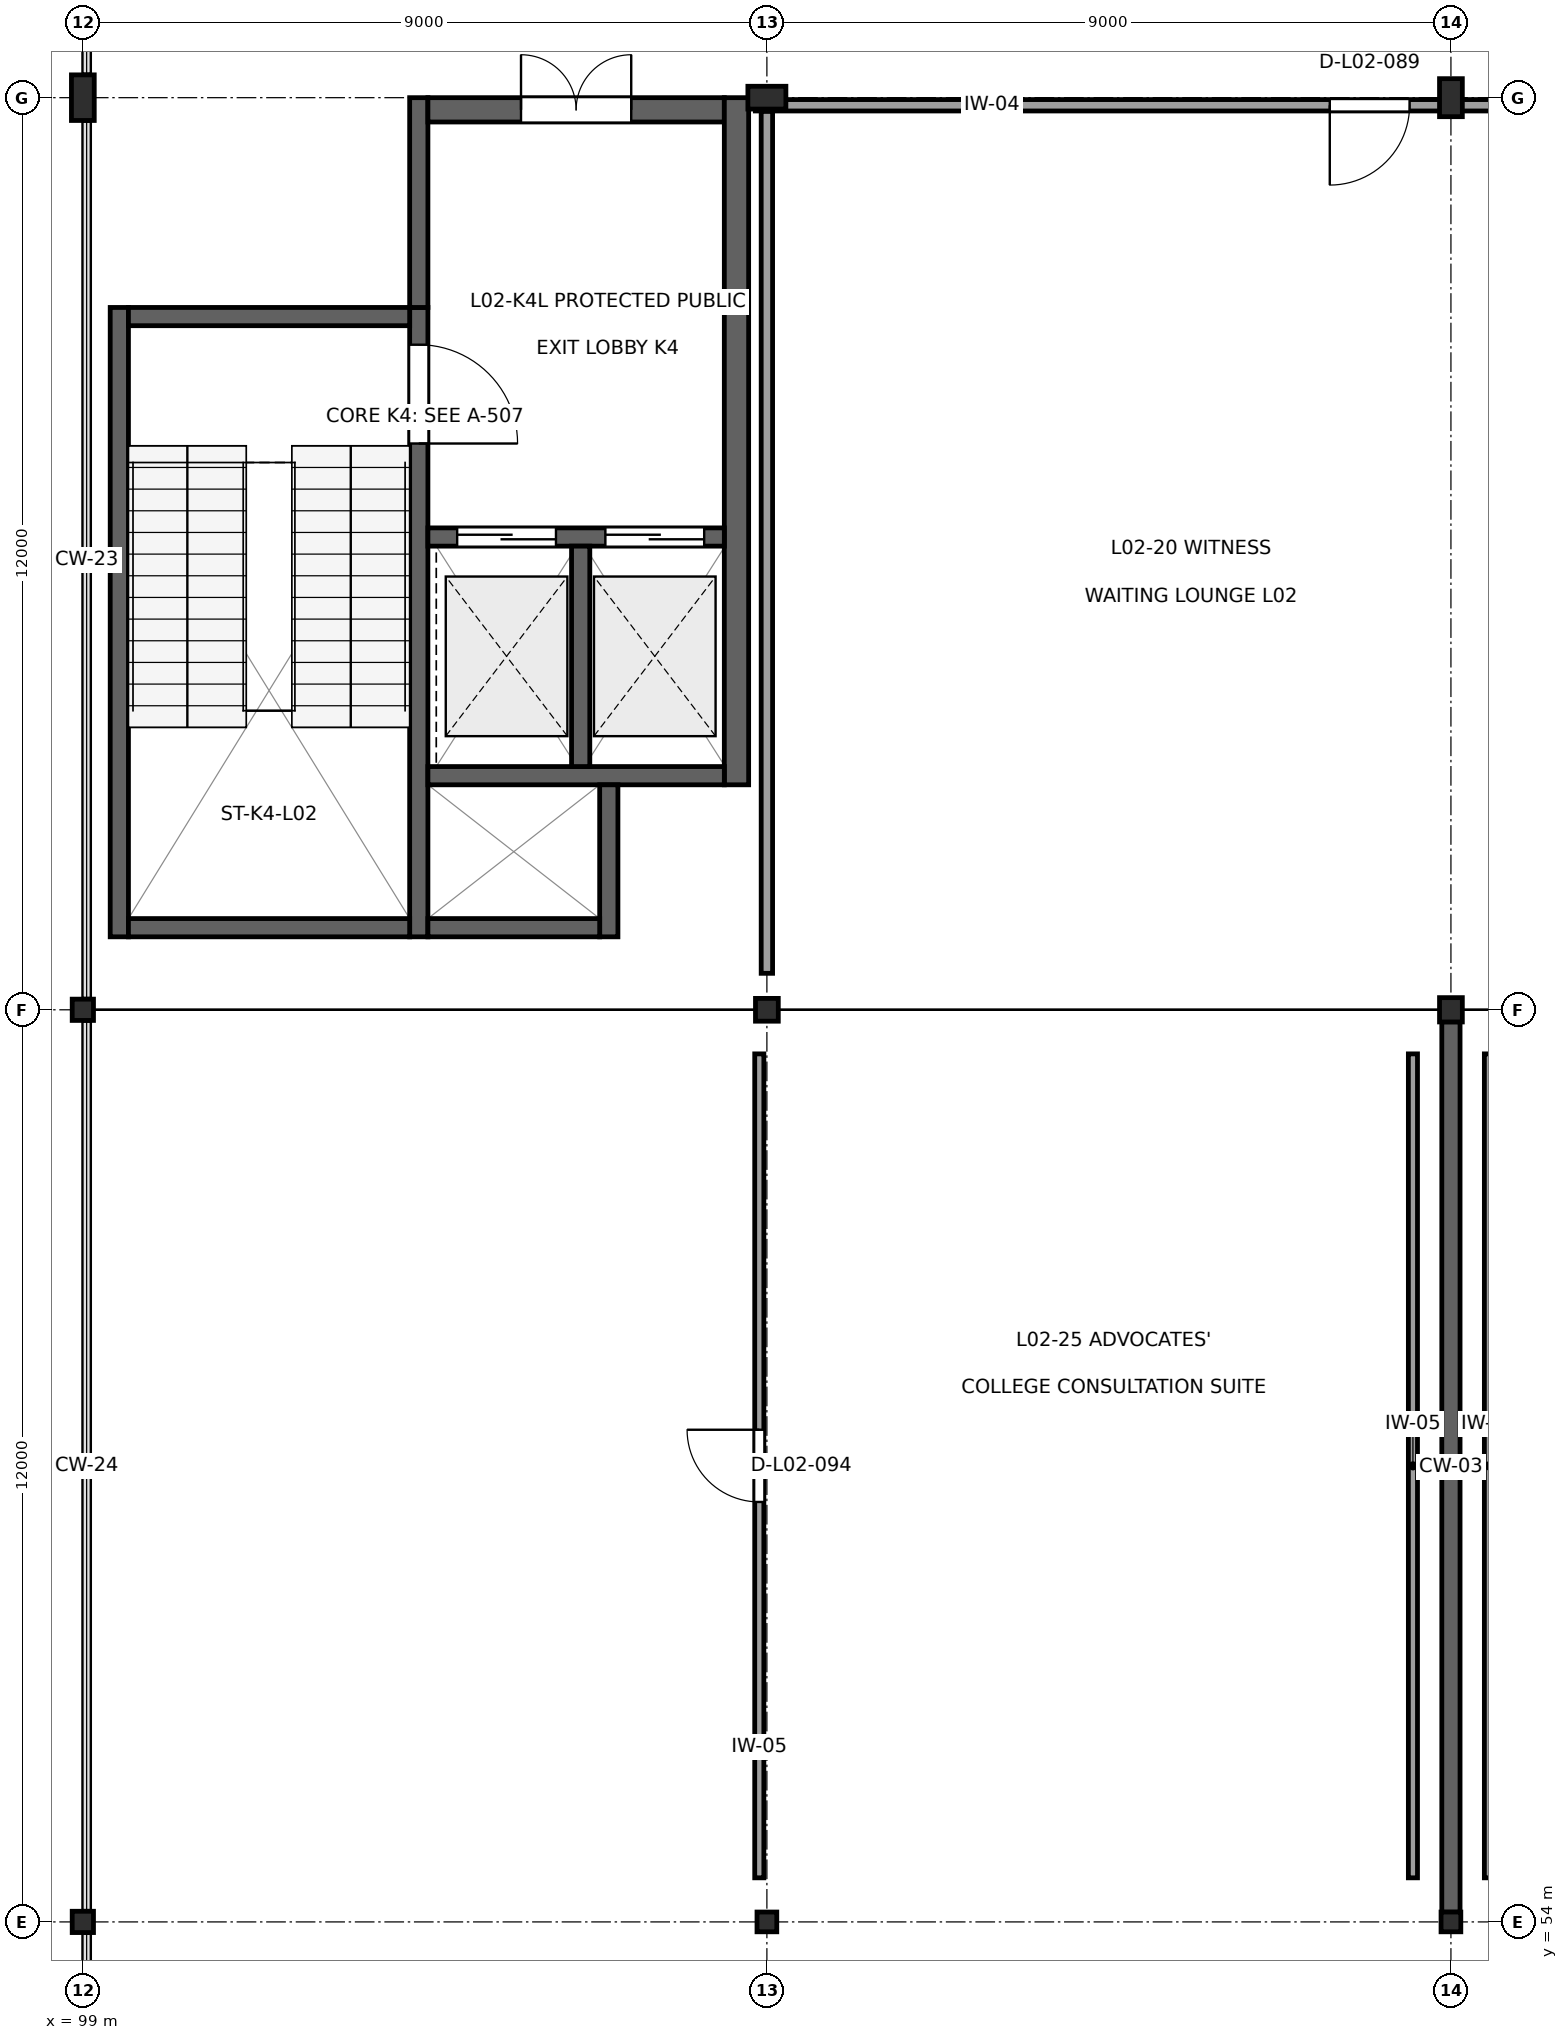
"""IFC4 building model, lengths in metres.
Left out: names, types, materials, properties, quantities, classifications, styles, units other than length and angle.
Written with IfcOpenShell. Run it as: python <this file> out.ifc"""

import sys

from ifc_helpers import new_model, si_unit, direction, frame, frame_2d, origin, origin_2d, place, context, subcontext, project, spatial, rectangle, i_section, extrude, element, fill, save


model = new_model("IFC4")
c1 = context("Model", 3, precision=1e-05, world=origin(), true_north=direction((0.0, 1.0)))
c2 = subcontext(c1, "Body", "Model", "MODEL_VIEW")
j1 = project(units=[si_unit("LENGTHUNIT", "METRE"), si_unit("PLANEANGLEUNIT", "RADIAN")], contexts=[c1])
p1 = place(None, origin())
s1 = spatial("IfcSite", under=j1, at=p1, CompositionType="ELEMENT")
p2 = place(p1, origin())
s2 = spatial("IfcBuilding", under=s1, at=p2, CompositionType="ELEMENT")
p3 = place(p2, frame((0.0, 0.0, 9.9)))
s3 = spatial("IfcBuildingStorey", under=s2, at=p3, CompositionType="ELEMENT", Elevation=9.9)
p4 = place(p3, frame((99.0, 54.0, 0.0), z_axis=(0.0, 0.0, 1.0), x_axis=(0.0, 1.0, 0.0)))
e1 = element("IfcColumn", 1, at=p4, inside=s3, PredefinedType="COLUMN", context=c2, shape_type="SweptSolid", body=[
    extrude(i_section(OverallWidth=0.28, OverallDepth=0.28, WebThickness=0.01, FlangeThickness=0.018, at=origin_2d()), origin(), (0.0, 0.0, 1.0), 4.3),
])
p5 = place(p3, frame((99.0, 66.0, 0.0), z_axis=(0.0, 0.0, 1.0), x_axis=(1.0, 0.0, 0.0)))
e2 = element("IfcColumn", 2, at=p5, inside=s3, PredefinedType="COLUMN", context=c2, shape_type="SweptSolid", body=[
    extrude(i_section(OverallWidth=0.28, OverallDepth=0.28, WebThickness=0.01, FlangeThickness=0.018, at=origin_2d()), origin(), (0.0, 0.0, 1.0), 4.5),
])
p6 = place(p3, frame((99.0, 78.0, 0.0), z_axis=(0.0, 0.0, 1.0), x_axis=(1.0, 0.0, 0.0)))
e3 = element("IfcColumn", 3, at=p6, inside=s3, PredefinedType="COLUMN", context=c2, shape_type="SweptSolid", body=[
    extrude(i_section(OverallWidth=0.3, OverallDepth=0.6, WebThickness=0.015, FlangeThickness=0.03, at=origin_2d()), origin(), (0.0, 0.0, 1.0), 4.5),
])
p7 = place(p3, frame((108.0, 54.0, 0.0), z_axis=(0.0, 0.0, 1.0), x_axis=(1.0, 0.0, 0.0)))
e4 = element("IfcColumn", 4, at=p7, inside=s3, PredefinedType="COLUMN", context=c2, shape_type="SweptSolid", body=[
    extrude(i_section(OverallWidth=0.26, OverallDepth=0.26, WebThickness=0.01, FlangeThickness=0.018, at=origin_2d()), origin(), (0.0, 0.0, 1.0), 4.3),
])
p8 = place(p3, frame((108.0, 66.0, 0.0), z_axis=(0.0, 0.0, 1.0), x_axis=(1.0, 0.0, 0.0)))
e5 = element("IfcColumn", 5, at=p8, inside=s3, PredefinedType="COLUMN", context=c2, shape_type="SweptSolid", body=[
    extrude(i_section(OverallWidth=0.3, OverallDepth=0.3, WebThickness=0.011, FlangeThickness=0.019, at=origin_2d()), origin(), (0.0, 0.0, 1.0), 4.5),
])
p9 = place(p3, frame((108.0, 78.0, 0.0), z_axis=(0.0, 0.0, 1.0), x_axis=(0.0, 1.0, 0.0)))
e6 = element("IfcColumn", 6, at=p9, inside=s3, PredefinedType="COLUMN", context=c2, shape_type="SweptSolid", body=[
    extrude(i_section(OverallWidth=0.3, OverallDepth=0.5, WebThickness=0.014, FlangeThickness=0.028, at=origin_2d()), origin(), (0.0, 0.0, 1.0), 4.5),
])
p10 = place(p3, frame((117.0, 54.0, 0.0), z_axis=(0.0, 0.0, 1.0), x_axis=(1.0, 0.0, 0.0)))
e7 = element("IfcColumn", 7, at=p10, inside=s3, PredefinedType="COLUMN", context=c2, shape_type="SweptSolid", body=[
    extrude(i_section(OverallWidth=0.26, OverallDepth=0.26, WebThickness=0.01, FlangeThickness=0.018, at=origin_2d()), origin(), (0.0, 0.0, 1.0), 4.3),
])
p11 = place(p3, frame((117.0, 66.0, 0.0), z_axis=(0.0, 0.0, 1.0), x_axis=(1.0, 0.0, 0.0)))
e8 = element("IfcColumn", 8, at=p11, inside=s3, PredefinedType="COLUMN", context=c2, shape_type="SweptSolid", body=[
    extrude(i_section(OverallWidth=0.3, OverallDepth=0.32, WebThickness=0.011, FlangeThickness=0.021, at=origin_2d()), origin(), (0.0, 0.0, 1.0), 4.5),
])
p12 = place(p3, frame((117.0, 78.0, 0.0), z_axis=(0.0, 0.0, 1.0), x_axis=(1.0, 0.0, 0.0)))
e9 = element("IfcColumn", 9, at=p12, inside=s3, PredefinedType="COLUMN", context=c2, shape_type="SweptSolid", body=[
    extrude(i_section(OverallWidth=0.3, OverallDepth=0.5, WebThickness=0.014, FlangeThickness=0.028, at=origin_2d()), origin(), (0.0, 0.0, 1.0), 4.5),
])
p13 = place(p3, frame((99.48, 66.96, 0.0), z_axis=(0.0, 0.0, 1.0), x_axis=(0.0, 1.0, 0.0)))
e10 = element("IfcWall", 10, at=p13, inside=s3, PredefinedType="SHEAR", context=c2, shape_type="SweptSolid", body=[
    extrude(rectangle(XDim=8.28, YDim=0.24, at=frame_2d((4.14, 0.0))), origin(), (0.0, 0.0, 1.0), 4.31),
])
p14 = place(p3, frame((103.42, 66.96, 0.0), z_axis=(0.0, 0.0, 1.0), x_axis=(0.0, 1.0, 0.0)))
e11 = element("IfcWall", 11, at=p14, inside=s3, PredefinedType="SHEAR", context=c2, shape_type="SweptSolid", body=[
    extrude(rectangle(XDim=8.28, YDim=0.24, at=frame_2d((4.14, 0.0))), origin(), (0.0, 0.0, 1.0), 4.31),
])
p15 = place(p14, frame((6.49, 0.0, 0.0)))
e12 = element("IfcOpeningElement", 12, at=p15, cuts=e11, PredefinedType="OPENING", context=c2, shape_type="SweptSolid", body=[
    extrude(rectangle(XDim=1.3, YDim=2.2, at=frame_2d((0.65, 1.1))), frame((0.0, 0.135, 0.0), z_axis=(0.0, -1.0, 0.0), x_axis=(1.0, 0.0, 0.0)), (0.0, 0.0, 1.0), 0.27),
])
for number, where, z_axis, x_axis in (
    (13, (99.6, 67.08, 0.0), (0.0, 0.0, 1.0), (1.0, 0.0, 0.0)),
    (14, (99.6, 75.12, 0.0), (0.0, 0.0, 1.0), (1.0, 0.0, 0.0)),
):
    element("IfcWall", number, at=place(p3, frame(where, z_axis=z_axis, x_axis=x_axis)), inside=s3, PredefinedType="SHEAR", context=c2, shape_type="SweptSolid", body=[
        extrude(rectangle(XDim=3.7, YDim=0.24, at=frame_2d((1.85, 0.0))), origin(), (0.0, 0.0, 1.0), 4.31),
    ])
p16 = place(p3, frame((103.42, 75.24, 0.0), z_axis=(0.0, 0.0, 1.0), x_axis=(0.0, 1.0, 0.0)))
e15 = element("IfcWall", 15, at=p16, inside=s3, PredefinedType="SHEAR", context=c2, shape_type="SweptSolid", body=[
    extrude(rectangle(XDim=2.76, YDim=0.24, at=frame_2d((1.38, 0.0))), origin(), (0.0, 0.0, 1.0), 4.16),
])
p17 = place(p3, frame((103.54, 77.84, 0.0), z_axis=(0.0, 0.0, 1.0), x_axis=(1.0, 0.0, 0.0)))
e16 = element("IfcWall", 16, at=p17, inside=s3, PredefinedType="SHEAR", context=c2, shape_type="SweptSolid", body=[
    extrude(rectangle(XDim=3.9, YDim=0.32, at=frame_2d((1.95, 0.0))), origin(), (0.0, 0.0, 1.0), 4.16),
])
p18 = place(p17, frame((1.225, 0.0, 0.0)))
e17 = element("IfcOpeningElement", 17, at=p18, cuts=e16, PredefinedType="OPENING", context=c2, shape_type="SweptSolid", body=[
    extrude(rectangle(XDim=1.45, YDim=2.2, at=frame_2d((0.725, 1.1))), frame((0.0, 0.175, 0.0), z_axis=(0.0, -1.0, 0.0), x_axis=(1.0, 0.0, 0.0)), (0.0, 0.0, 1.0), 0.35),
])
p19 = place(p3, frame((107.6, 68.96, 0.0), z_axis=(0.0, 0.0, 1.0), x_axis=(0.0, 1.0, 0.0)))
e18 = element("IfcWall", 18, at=p19, inside=s3, PredefinedType="SHEAR", context=c2, shape_type="SweptSolid", body=[
    extrude(rectangle(XDim=9.04, YDim=0.32, at=frame_2d((4.52, 0.0))), origin(), (0.0, 0.0, 1.0), 4.16),
])
p20 = place(p3, frame((103.54, 72.22, 0.0), z_axis=(0.0, 0.0, 1.0), x_axis=(1.0, 0.0, 0.0)))
e19 = element("IfcWall", 19, at=p20, inside=s3, PredefinedType="SHEAR", context=c2, shape_type="SweptSolid", body=[
    extrude(rectangle(XDim=3.9, YDim=0.24, at=frame_2d((1.95, 0.0))), origin(), (0.0, 0.0, 1.0), 4.31),
])
p21 = place(p20, frame((0.385, 0.0, 0.0)))
e20 = element("IfcOpeningElement", 20, at=p21, cuts=e19, PredefinedType="OPENING", context=c2, shape_type="SweptSolid", body=[
    extrude(rectangle(XDim=1.3, YDim=2.2, at=frame_2d((0.65, 1.1))), frame((0.0, 0.135, 0.0), z_axis=(0.0, -1.0, 0.0), x_axis=(1.0, 0.0, 0.0)), (0.0, 0.0, 1.0), 0.27),
])
p22 = place(p20, frame((2.335, 0.0, 0.0)))
e21 = element("IfcOpeningElement", 21, at=p22, cuts=e19, PredefinedType="OPENING", context=c2, shape_type="SweptSolid", body=[
    extrude(rectangle(XDim=1.3, YDim=2.2, at=frame_2d((0.65, 1.1))), frame((0.0, 0.135, 0.0), z_axis=(0.0, -1.0, 0.0), x_axis=(1.0, 0.0, 0.0)), (0.0, 0.0, 1.0), 0.27),
])
p23 = place(p3, frame((103.54, 69.08, 0.0), z_axis=(0.0, 0.0, 1.0), x_axis=(1.0, 0.0, 0.0)))
e22 = element("IfcWall", 22, at=p23, inside=s3, PredefinedType="SHEAR", context=c2, shape_type="SweptSolid", body=[
    extrude(rectangle(XDim=3.9, YDim=0.24, at=frame_2d((1.95, 0.0))), origin(), (0.0, 0.0, 1.0), 4.31),
])
p24 = place(p3, frame((105.55, 69.2, 0.0), z_axis=(0.0, 0.0, 1.0), x_axis=(0.0, 1.0, 0.0)))
e23 = element("IfcWall", 23, at=p24, inside=s3, PredefinedType="SHEAR", context=c2, shape_type="SweptSolid", body=[
    extrude(rectangle(XDim=2.9, YDim=0.24, at=frame_2d((1.45, 0.0))), origin(), (0.0, 0.0, 1.0), 4.31),
])
p25 = place(p3, frame((105.92, 66.96, 0.0), z_axis=(0.0, 0.0, 1.0), x_axis=(0.0, 1.0, 0.0)))
e24 = element("IfcWall", 24, at=p25, inside=s3, PredefinedType="SHEAR", context=c2, shape_type="SweptSolid", body=[
    extrude(rectangle(XDim=2.0, YDim=0.24, at=frame_2d((1.0, 0.0))), origin(), (0.0, 0.0, 1.0), 4.31),
])
p26 = place(p3, frame((103.54, 67.08, 0.0), z_axis=(0.0, 0.0, 1.0), x_axis=(1.0, 0.0, 0.0)))
e25 = element("IfcWall", 25, at=p26, inside=s3, PredefinedType="SHEAR", context=c2, shape_type="SweptSolid", body=[
    extrude(rectangle(XDim=2.26, YDim=0.24, at=frame_2d((1.13, 0.0))), origin(), (0.0, 0.0, 1.0), 4.31),
])
p27 = place(p3, frame((117.0, 54.128, 0.0), z_axis=(0.0, 0.0, 1.0), x_axis=(0.0, 1.0, 0.0)))
e26 = element("IfcWall", 26, at=p27, inside=s3, PredefinedType="SHEAR", context=c2, shape_type="SweptSolid", body=[
    extrude(rectangle(XDim=11.714, YDim=0.24, at=frame_2d((5.857, 0.0))), origin(), (0.0, 0.0, 1.0), 3.745),
])
p28 = place(p3, frame((108.0, 66.48, 0.0), z_axis=(0.0, 0.0, 1.0), x_axis=(0.0, 1.0, 0.0)))
e27 = element("IfcWall", 27, at=p28, inside=s3, PredefinedType="PARTITIONING", context=c2, shape_type="SweptSolid", body=[
    extrude(rectangle(XDim=11.34, YDim=0.15, at=frame_2d((5.67, 0.0))), origin(), (0.0, 0.0, 1.0), 3.705),
])
p29 = place(p3, frame((107.848, 77.9, 0.0), z_axis=(0.0, 0.0, 1.0), x_axis=(1.0, 0.0, 0.0)))
e28 = element("IfcWall", 28, at=p29, inside=s3, PredefinedType="PARTITIONING", context=c2, shape_type="SweptSolid", body=[
    extrude(rectangle(XDim=17.572, YDim=0.15, at=frame_2d((8.786, 0.0))), origin(), (0.0, 0.0, 1.0), 3.705),
])
p30 = place(p29, frame((7.558, 0.0, 0.0)))
e29 = element("IfcOpeningElement", 29, at=p30, cuts=e28, PredefinedType="OPENING", context=c2, shape_type="SweptSolid", body=[
    extrude(rectangle(XDim=1.05, YDim=2.25, at=frame_2d((0.525, 1.125))), frame((0.0, 0.09, 0.0), z_axis=(0.0, -1.0, 0.0), x_axis=(1.0, 0.0, 0.0)), (0.0, 0.0, 1.0), 0.18),
])
p31 = place(p3, frame((116.5, 65.42, 0.0), z_axis=(0.0, 0.0, 1.0), x_axis=(0.0, -1.0, 0.0)))
e30 = element("IfcWall", 30, at=p31, inside=s3, PredefinedType="PARTITIONING", context=c2, shape_type="SweptSolid", body=[
    extrude(rectangle(XDim=10.84, YDim=0.12, at=frame_2d((5.42, 0.0))), origin(), (0.0, 0.0, 1.0), 4.14),
])
p32 = place(p3, frame((107.9, 54.58, 0.0), z_axis=(0.0, 0.0, 1.0), x_axis=(0.0, 1.0, 0.0)))
e31 = element("IfcWall", 31, at=p32, inside=s3, PredefinedType="PARTITIONING", context=c2, shape_type="SweptSolid", body=[
    extrude(rectangle(XDim=10.84, YDim=0.12, at=frame_2d((5.42, 0.0))), origin(), (0.0, 0.0, 1.0), 3.805),
])
p33 = place(p32, frame((4.945, 0.0, 0.0)))
e32 = element("IfcOpeningElement", 32, at=p33, cuts=e31, PredefinedType="OPENING", context=c2, shape_type="SweptSolid", body=[
    extrude(rectangle(XDim=0.95, YDim=2.15, at=frame_2d((0.475, 1.075))), frame((0.0, 0.075, 0.0), z_axis=(0.0, -1.0, 0.0), x_axis=(1.0, 0.0, 0.0)), (0.0, 0.0, 1.0), 0.15),
])
p34 = place(p3, frame((117.5, 54.58, 0.0), z_axis=(0.0, 0.0, 1.0), x_axis=(0.0, 1.0, 0.0)))
e33 = element("IfcWall", 33, at=p34, inside=s3, PredefinedType="PARTITIONING", context=c2, shape_type="SweptSolid", body=[
    extrude(rectangle(XDim=10.84, YDim=0.12, at=frame_2d((5.42, 0.0))), origin(), (0.0, 0.0, 1.0), 4.14),
])
p35 = place(p15, frame((1.3, 0.0, 0.0), z_axis=(0.0, 0.0, 1.0), x_axis=(-1.0, 0.0, 0.0)))
e34 = element("IfcDoor", 34, at=p35, inside=s3, OperationType="SINGLE_SWING_LEFT", PredefinedType="DOOR", context=c2, shape_type="SweptSolid", body=[
    extrude(rectangle(XDim=1.3, YDim=2.2, at=frame_2d((0.65, 1.1))), frame((0.0, 0.025, 0.0), z_axis=(0.0, -1.0, 0.0), x_axis=(1.0, 0.0, 0.0)), (0.0, 0.0, 1.0), 0.05),
])
fill(e12, e34)
p36 = place(p18, origin())
e35 = element("IfcDoor", 35, at=p36, inside=s3, OperationType="DOUBLE_DOOR_SINGLE_SWING", PredefinedType="DOOR", context=c2, shape_type="SweptSolid", body=[
    extrude(rectangle(XDim=1.45, YDim=2.2, at=frame_2d((0.725, 1.1))), frame((0.0, 0.025, 0.0), z_axis=(0.0, -1.0, 0.0), x_axis=(1.0, 0.0, 0.0)), (0.0, 0.0, 1.0), 0.05),
])
fill(e17, e35)
p37 = place(p21, origin())
e36 = element("IfcDoor", 36, at=p37, inside=s3, OperationType="DOUBLE_DOOR_SLIDING", PredefinedType="DOOR", context=c2, shape_type="SweptSolid", body=[
    extrude(rectangle(XDim=1.3, YDim=2.2, at=frame_2d((0.65, 1.1))), frame((0.0, 0.025, 0.0), z_axis=(0.0, -1.0, 0.0), x_axis=(1.0, 0.0, 0.0)), (0.0, 0.0, 1.0), 0.05),
])
fill(e20, e36)
p38 = place(p22, origin())
e37 = element("IfcDoor", 37, at=p38, inside=s3, OperationType="DOUBLE_DOOR_SLIDING", PredefinedType="DOOR", context=c2, shape_type="SweptSolid", body=[
    extrude(rectangle(XDim=1.3, YDim=2.2, at=frame_2d((0.65, 1.1))), frame((0.0, 0.025, 0.0), z_axis=(0.0, -1.0, 0.0), x_axis=(1.0, 0.0, 0.0)), (0.0, 0.0, 1.0), 0.05),
])
fill(e21, e37)
p39 = place(p30, frame((1.05, 0.0, 0.0), z_axis=(0.0, 0.0, 1.0), x_axis=(-1.0, 0.0, 0.0)))
e38 = element("IfcDoor", 38, at=p39, inside=s3, OperationType="SINGLE_SWING_LEFT", PredefinedType="DOOR", context=c2, shape_type="SweptSolid", body=[
    extrude(rectangle(XDim=1.05, YDim=2.25, at=frame_2d((0.525, 1.125))), frame((0.0, 0.025, 0.0), z_axis=(0.0, -1.0, 0.0), x_axis=(1.0, 0.0, 0.0)), (0.0, 0.0, 1.0), 0.05),
])
fill(e29, e38)
p40 = place(p33, origin())
e39 = element("IfcDoor", 39, at=p40, inside=s3, OperationType="SINGLE_SWING_RIGHT", PredefinedType="DOOR", context=c2, shape_type="SweptSolid", body=[
    extrude(rectangle(XDim=0.95, YDim=2.15, at=frame_2d((0.475, 1.075))), frame((0.0, 0.025, 0.0), z_axis=(0.0, -1.0, 0.0), x_axis=(1.0, 0.0, 0.0)), (0.0, 0.0, 1.0), 0.05),
])
fill(e32, e39)
save(model, sys.argv[1])
